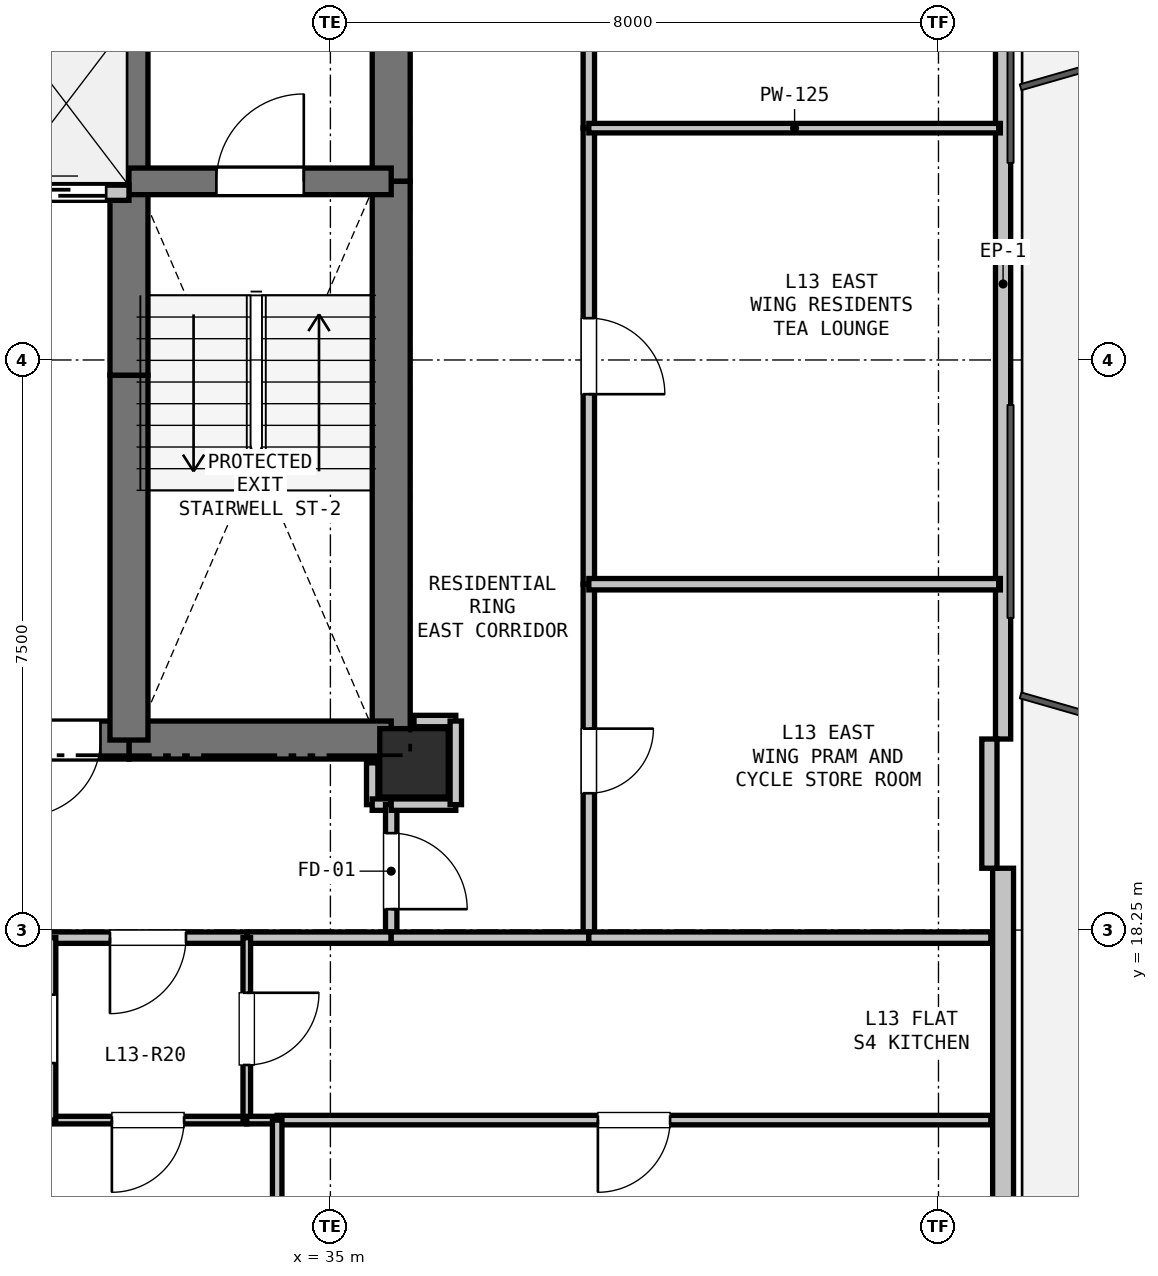
"""IFC4 building model, lengths in metres.
Left out: names, types, materials, properties, quantities, classifications, styles, units other than length and angle.
Written with IfcOpenShell. Run it as: python <this file> out.ifc"""

import sys

from ifc_helpers import new_model, si_unit, direction, frame, frame_2d, origin, origin_2d, place, context, subcontext, project, spatial, rectangle, extrude, element, fill, save


model = new_model("IFC4")
c1 = context("Model", 3, precision=1e-05, world=origin(), true_north=direction((0.0, 1.0)))
c2 = subcontext(c1, "Body", "Model", "MODEL_VIEW")
j1 = project(units=[si_unit("LENGTHUNIT", "METRE"), si_unit("PLANEANGLEUNIT", "RADIAN")], contexts=[c1])
p1 = place(None, origin())
s1 = spatial("IfcSite", under=j1, at=p1, CompositionType="ELEMENT")
p2 = place(p1, origin())
s2 = spatial("IfcBuilding", under=s1, at=p2, CompositionType="ELEMENT")
p3 = place(p2, frame((0.0, 0.0, 48.9)))
s3 = spatial("IfcBuildingStorey", under=s2, at=p3, CompositionType="ELEMENT", Elevation=48.9)
p4 = place(p3, frame((36.1, 20.45, 0.0), z_axis=(0.0, 0.0, 1.0), x_axis=(1.0, 0.0, 0.0)))
e1 = element("IfcColumn", 1, at=p4, inside=s3, PredefinedType="COLUMN", context=c2, shape_type="SweptSolid", body=[
    extrude(rectangle(XDim=0.9, YDim=0.9, at=origin_2d()), origin(), (0.0, 0.0, 1.0), 3.3),
])
p5 = place(p3, frame((43.85, 32.737, 0.0), z_axis=(0.0, 0.0, 1.0), x_axis=(0.0, -1.0, 0.0)))
e2 = element("IfcWall", 2, at=p5, inside=s3, PredefinedType="PARAPET", context=c2, shape_type="SweptSolid", body=[
    extrude(rectangle(XDim=11.973, YDim=0.2, at=frame_2d((5.987, 0.0))), origin(), (0.0, 0.0, 1.0), 0.2),
])
p6 = place(p3, frame((43.85, 19.063, 0.0), z_axis=(0.0, 0.0, 1.0), x_axis=(0.0, -1.0, 0.0)))
e3 = element("IfcWall", 3, at=p6, inside=s3, PredefinedType="SOLIDWALL", context=c2, shape_type="SweptSolid", body=[
    extrude(rectangle(XDim=12.673, YDim=0.275, at=frame_2d((6.336, 0.0))), origin(), (0.0, 0.0, 1.0), 2.66),
])
p7 = place(p3, frame((43.67, 20.763, 0.0), z_axis=(0.0, 0.0, 1.0), x_axis=(0.0, -1.0, 0.0)))
e4 = element("IfcWall", 4, at=p7, inside=s3, PredefinedType="PARAPET", context=c2, shape_type="SweptSolid", body=[
    extrude(rectangle(XDim=1.7, YDim=0.2, at=frame_2d((0.85, 0.0))), origin(), (0.0, 0.0, 1.0), 2.66),
])
p8 = place(p3, frame((35.8, 32.75, 0.0), z_axis=(0.0, 0.0, 1.0), x_axis=(0.0, -1.0, 0.0)))
e5 = element("IfcWall", 5, at=p8, inside=s3, PredefinedType="SHEAR", context=c2, shape_type="SweptSolid", body=[
    extrude(rectangle(XDim=4.65, YDim=0.5, at=frame_2d((2.325, 0.0))), origin(), (0.0, 0.0, 1.0), 3.04),
])
p9 = place(p3, frame((35.8, 28.1, 0.0), z_axis=(0.0, 0.0, 1.0), x_axis=(0.0, -1.0, 0.0)))
e6 = element("IfcWall", 6, at=p9, inside=s3, PredefinedType="SHEAR", context=c2, shape_type="SweptSolid", body=[
    extrude(rectangle(XDim=7.35, YDim=0.5, at=frame_2d((3.675, 0.0))), origin(), (0.0, 0.0, 1.0), 3.04),
])
p10 = place(p3, frame((35.8, 20.75, 0.0), z_axis=(0.0, 0.0, 1.0), x_axis=(-1.0, 0.0, 0.0)))
e7 = element("IfcWall", 7, at=p10, inside=s3, PredefinedType="SHEAR", context=c2, shape_type="SweptSolid", body=[
    extrude(rectangle(XDim=3.45, YDim=0.5, at=frame_2d((1.725, 0.0))), origin(), (0.0, 0.0, 1.0), 3.04),
])
p11 = place(p3, frame((32.35, 20.75, 0.0), z_axis=(0.0, 0.0, 1.0), x_axis=(-1.0, 0.0, 0.0)))
e8 = element("IfcWall", 8, at=p11, inside=s3, PredefinedType="SHEAR", context=c2, shape_type="SweptSolid", body=[
    extrude(rectangle(XDim=1.75, YDim=0.5, at=frame_2d((0.875, 0.0))), origin(), (0.0, 0.0, 1.0), 3.04),
])
p12 = place(p11, frame((0.375, 0.0, 0.0)))
e9 = element("IfcOpeningElement", 9, at=p12, cuts=e8, PredefinedType="OPENING", context=c2, shape_type="SweptSolid", body=[
    extrude(rectangle(XDim=1.0, YDim=2.15, at=frame_2d((0.5, 1.075))), frame((0.0, 0.26, 0.0), z_axis=(0.0, -1.0, 0.0), x_axis=(1.0, 0.0, 0.0)), (0.0, 0.0, 1.0), 0.52),
])
p13 = place(p3, frame((32.35, 20.75, 0.0), z_axis=(0.0, 0.0, 1.0), x_axis=(0.0, 1.0, 0.0)))
e10 = element("IfcWall", 10, at=p13, inside=s3, PredefinedType="SHEAR", context=c2, shape_type="SweptSolid", body=[
    extrude(rectangle(XDim=4.8, YDim=0.5, at=frame_2d((2.4, 0.0))), origin(), (0.0, 0.0, 1.0), 3.04),
])
p14 = place(p3, frame((32.35, 25.55, 0.0), z_axis=(0.0, 0.0, 1.0), x_axis=(0.0, 1.0, 0.0)))
e11 = element("IfcWall", 11, at=p14, inside=s3, PredefinedType="SHEAR", context=c2, shape_type="SweptSolid", body=[
    extrude(rectangle(XDim=2.4, YDim=0.5, at=frame_2d((1.2, 0.0))), origin(), (0.0, 0.0, 1.0), 3.04),
])
p15 = place(p3, frame((32.35, 27.95, 0.0), z_axis=(0.0, 0.0, 1.0), x_axis=(0.0, 1.0, 0.0)))
e12 = element("IfcWall", 12, at=p15, inside=s3, PredefinedType="SHEAR", context=c2, shape_type="SweptSolid", body=[
    extrude(rectangle(XDim=2.8, YDim=0.5, at=frame_2d((1.4, 0.0))), origin(), (0.0, 0.0, 1.0), 3.04),
])
p16 = place(p3, frame((32.35, 28.1, 0.0), z_axis=(0.0, 0.0, 1.0), x_axis=(1.0, 0.0, 0.0)))
e13 = element("IfcWall", 13, at=p16, inside=s3, PredefinedType="SHEAR", context=c2, shape_type="SweptSolid", body=[
    extrude(rectangle(XDim=3.45, YDim=0.35, at=frame_2d((1.725, 0.0))), origin(), (0.0, 0.0, 1.0), 3.04),
])
p17 = place(p16, frame((1.15, 0.0, 0.0)))
e14 = element("IfcOpeningElement", 14, at=p17, cuts=e13, PredefinedType="OPENING", context=c2, shape_type="SweptSolid", body=[
    extrude(rectangle(XDim=1.15, YDim=2.15, at=frame_2d((0.575, 1.075))), frame((0.0, 0.185, 0.0), z_axis=(0.0, -1.0, 0.0), x_axis=(1.0, 0.0, 0.0)), (0.0, 0.0, 1.0), 0.37),
])
p18 = place(p3, frame((27.4, 27.95, 0.0), z_axis=(0.0, 0.0, 1.0), x_axis=(1.0, 0.0, 0.0)))
e15 = element("IfcWall", 15, at=p18, inside=s3, PredefinedType="PARTITIONING", context=c2, shape_type="SweptSolid", body=[
    extrude(rectangle(XDim=4.95, YDim=0.2, at=frame_2d((2.475, 0.0))), origin(), (0.0, 0.0, 1.0), 3.04),
])
p19 = place(p18, frame((0.25, 0.0, 0.0)))
e16 = element("IfcOpeningElement", 16, at=p19, cuts=e15, PredefinedType="OPENING", context=c2, shape_type="SweptSolid", body=[
    extrude(rectangle(XDim=1.1, YDim=2.15, at=frame_2d((0.55, 1.075))), frame((0.0, 0.11, 0.0), z_axis=(0.0, -1.0, 0.0), x_axis=(1.0, 0.0, 0.0)), (0.0, 0.0, 1.0), 0.22),
])
p20 = place(p18, frame((1.9, 0.0, 0.0)))
e17 = element("IfcOpeningElement", 17, at=p20, cuts=e15, PredefinedType="OPENING", context=c2, shape_type="SweptSolid", body=[
    extrude(rectangle(XDim=1.1, YDim=2.15, at=frame_2d((0.55, 1.075))), frame((0.0, 0.11, 0.0), z_axis=(0.0, -1.0, 0.0), x_axis=(1.0, 0.0, 0.0)), (0.0, 0.0, 1.0), 0.22),
])
p21 = place(p18, frame((3.55, 0.0, 0.0)))
e18 = element("IfcOpeningElement", 18, at=p21, cuts=e15, PredefinedType="OPENING", context=c2, shape_type="SweptSolid", body=[
    extrude(rectangle(XDim=1.1, YDim=2.15, at=frame_2d((0.55, 1.075))), frame((0.0, 0.11, 0.0), z_axis=(0.0, -1.0, 0.0), x_axis=(1.0, 0.0, 0.0)), (0.0, 0.0, 1.0), 0.22),
])
p22 = place(p3, frame((35.55, 20.45, 0.0), z_axis=(0.0, 0.0, 1.0), x_axis=(0.0, -1.0, 0.0)))
e19 = element("IfcWall", 19, at=p22, inside=s3, PredefinedType="PARTITIONING", context=c2, shape_type="SweptSolid", body=[
    extrude(rectangle(XDim=0.55, YDim=0.15, at=frame_2d((0.275, 0.0))), origin(), (0.0, 0.0, 1.0), 2.488),
])
p23 = place(p3, frame((35.55, 19.9, 0.0), z_axis=(0.0, 0.0, 1.0), x_axis=(1.0, 0.0, 0.0)))
e20 = element("IfcWall", 20, at=p23, inside=s3, PredefinedType="PARTITIONING", context=c2, shape_type="SweptSolid", body=[
    extrude(rectangle(XDim=0.25, YDim=0.15, at=frame_2d((0.125, 0.0))), origin(), (0.0, 0.0, 1.0), 3.04),
])
p24 = place(p3, frame((35.8, 19.9, 0.0), z_axis=(0.0, 0.0, 1.0), x_axis=(0.0, -1.0, 0.0)))
e21 = element("IfcWall", 21, at=p24, inside=s3, PredefinedType="PARTITIONING", context=c2, shape_type="SweptSolid", body=[
    extrude(rectangle(XDim=1.75, YDim=0.15, at=frame_2d((0.875, 0.0))), origin(), (0.0, 0.0, 1.0), 3.04),
])
p25 = place(p24, frame((0.375, 0.0, 0.0)))
e22 = element("IfcOpeningElement", 22, at=p25, cuts=e21, PredefinedType="OPENING", context=c2, shape_type="SweptSolid", body=[
    extrude(rectangle(XDim=1.0, YDim=2.15, at=frame_2d((0.5, 1.075))), frame((0.0, 0.085, 0.0), z_axis=(0.0, -1.0, 0.0), x_axis=(1.0, 0.0, 0.0)), (0.0, 0.0, 1.0), 0.17),
])
p26 = place(p3, frame((35.8, 18.15, 0.0), z_axis=(0.0, 0.0, 1.0), x_axis=(-1.0, 0.0, 0.0)))
e23 = element("IfcWall", 23, at=p26, inside=s3, PredefinedType="PARTITIONING", context=c2, shape_type="SweptSolid", body=[
    extrude(rectangle(XDim=1.9, YDim=0.15, at=frame_2d((0.95, 0.0))), origin(), (0.0, 0.0, 1.0), 3.04),
])
p27 = place(p3, frame((33.9, 18.15, 0.0), z_axis=(0.0, 0.0, 1.0), x_axis=(-1.0, 0.0, 0.0)))
e24 = element("IfcWall", 24, at=p27, inside=s3, PredefinedType="PARTITIONING", context=c2, shape_type="SweptSolid", body=[
    extrude(rectangle(XDim=2.6, YDim=0.15, at=frame_2d((1.3, 0.0))), origin(), (0.0, 0.0, 1.0), 3.04),
])
p28 = place(p27, frame((0.8, 0.0, 0.0)))
e25 = element("IfcOpeningElement", 25, at=p28, cuts=e24, PredefinedType="OPENING", context=c2, shape_type="SweptSolid", body=[
    extrude(rectangle(XDim=1.0, YDim=2.15, at=frame_2d((0.5, 1.075))), frame((0.0, 0.085, 0.0), z_axis=(0.0, -1.0, 0.0), x_axis=(1.0, 0.0, 0.0)), (0.0, 0.0, 1.0), 0.17),
])
p29 = place(p3, frame((36.65, 21.0, 0.0), z_axis=(0.0, 0.0, 1.0), x_axis=(-1.0, 0.0, 0.0)))
e26 = element("IfcWall", 26, at=p29, inside=s3, PredefinedType="PARTITIONING", context=c2, shape_type="SweptSolid", body=[
    extrude(rectangle(XDim=0.55, YDim=0.15, at=frame_2d((0.275, 0.0))), origin(), (0.0, 0.0, 1.0), 2.488),
])
p30 = place(p3, frame((38.4, 32.08, 0.0), z_axis=(0.0, 0.0, 1.0), x_axis=(0.0, -1.0, 0.0)))
e27 = element("IfcWall", 27, at=p30, inside=s3, PredefinedType="PARTITIONING", context=c2, shape_type="SweptSolid", body=[
    extrude(rectangle(XDim=3.28, YDim=0.15, at=frame_2d((1.64, 0.0))), origin(), (0.0, 0.0, 1.0), 3.04),
])
p31 = place(p30, frame((1.14, 0.0, 0.0)))
e28 = element("IfcOpeningElement", 28, at=p31, cuts=e27, PredefinedType="OPENING", context=c2, shape_type="SweptSolid", body=[
    extrude(rectangle(XDim=1.0, YDim=2.15, at=frame_2d((0.5, 1.075))), frame((0.0, 0.085, 0.0), z_axis=(0.0, -1.0, 0.0), x_axis=(1.0, 0.0, 0.0)), (0.0, 0.0, 1.0), 0.17),
])
p32 = place(p3, frame((38.4, 28.8, 0.0), z_axis=(0.0, 0.0, 1.0), x_axis=(0.0, -1.0, 0.0)))
e29 = element("IfcWall", 29, at=p32, inside=s3, PredefinedType="PARTITIONING", context=c2, shape_type="SweptSolid", body=[
    extrude(rectangle(XDim=6.0, YDim=0.15, at=frame_2d((3.0, 0.0))), origin(), (0.0, 0.0, 1.0), 3.04),
])
p33 = place(p32, frame((2.5, 0.0, 0.0)))
e30 = element("IfcOpeningElement", 30, at=p33, cuts=e29, PredefinedType="OPENING", context=c2, shape_type="SweptSolid", body=[
    extrude(rectangle(XDim=1.0, YDim=2.15, at=frame_2d((0.5, 1.075))), frame((0.0, 0.085, 0.0), z_axis=(0.0, -1.0, 0.0), x_axis=(1.0, 0.0, 0.0)), (0.0, 0.0, 1.0), 0.17),
])
p34 = place(p3, frame((38.4, 22.8, 0.0), z_axis=(0.0, 0.0, 1.0), x_axis=(0.0, -1.0, 0.0)))
e31 = element("IfcWall", 31, at=p34, inside=s3, PredefinedType="PARTITIONING", context=c2, shape_type="SweptSolid", body=[
    extrude(rectangle(XDim=4.65, YDim=0.15, at=frame_2d((2.325, 0.0))), origin(), (0.0, 0.0, 1.0), 3.04),
])
p35 = place(p34, frame((1.9, 0.0, 0.0)))
e32 = element("IfcOpeningElement", 32, at=p35, cuts=e31, PredefinedType="OPENING", context=c2, shape_type="SweptSolid", body=[
    extrude(rectangle(XDim=0.85, YDim=2.1, at=frame_2d((0.425, 1.05))), frame((0.0, 0.085, 0.0), z_axis=(0.0, -1.0, 0.0), x_axis=(1.0, 0.0, 0.0)), (0.0, 0.0, 1.0), 0.17),
])
p36 = place(p3, frame((38.4, 18.15, 0.0), z_axis=(0.0, 0.0, 1.0), x_axis=(-1.0, 0.0, 0.0)))
e33 = element("IfcWall", 33, at=p36, inside=s3, PredefinedType="PARTITIONING", context=c2, shape_type="SweptSolid", body=[
    extrude(rectangle(XDim=2.6, YDim=0.15, at=frame_2d((1.3, 0.0))), origin(), (0.0, 0.0, 1.0), 2.338),
])
p37 = place(p3, frame((35.8, 19.9, 0.0), z_axis=(0.0, 0.0, 1.0), x_axis=(1.0, 0.0, 0.0)))
e34 = element("IfcWall", 34, at=p37, inside=s3, PredefinedType="PARTITIONING", context=c2, shape_type="SweptSolid", body=[
    extrude(rectangle(XDim=0.85, YDim=0.15, at=frame_2d((0.425, 0.0))), origin(), (0.0, 0.0, 1.0), 2.338),
])
p38 = place(p3, frame((36.65, 19.9, 0.0), z_axis=(0.0, 0.0, 1.0), x_axis=(0.0, 1.0, 0.0)))
e35 = element("IfcWall", 35, at=p38, inside=s3, PredefinedType="PARTITIONING", context=c2, shape_type="SweptSolid", body=[
    extrude(rectangle(XDim=1.1, YDim=0.15, at=frame_2d((0.55, 0.0))), origin(), (0.0, 0.0, 1.0), 3.04),
])
p39 = place(p3, frame((33.9, 15.75, 0.0), z_axis=(0.0, 0.0, 1.0), x_axis=(-1.0, 0.0, 0.0)))
e36 = element("IfcWall", 36, at=p39, inside=s3, PredefinedType="PARTITIONING", context=c2, shape_type="SweptSolid", body=[
    extrude(rectangle(XDim=2.6, YDim=0.1, at=frame_2d((1.3, 0.0))), origin(), (0.0, 0.0, 1.0), 3.04),
])
p40 = place(p39, frame((0.825, 0.0, 0.0)))
e37 = element("IfcOpeningElement", 37, at=p40, cuts=e36, PredefinedType="OPENING", context=c2, shape_type="SweptSolid", body=[
    extrude(rectangle(XDim=0.95, YDim=2.1, at=frame_2d((0.475, 1.05))), frame((0.0, 0.06, 0.0), z_axis=(0.0, -1.0, 0.0), x_axis=(1.0, 0.0, 0.0)), (0.0, 0.0, 1.0), 0.12),
])
p41 = place(p3, frame((31.3, 15.75, 0.0), z_axis=(0.0, 0.0, 1.0), x_axis=(0.0, 1.0, 0.0)))
e38 = element("IfcWall", 38, at=p41, inside=s3, PredefinedType="PLUMBINGWALL", context=c2, shape_type="SweptSolid", body=[
    extrude(rectangle(XDim=2.4, YDim=0.175, at=frame_2d((1.2, 0.0))), origin(), (0.0, 0.0, 1.0), 3.04),
])
p42 = place(p41, frame((0.75, 0.0, 0.0)))
e39 = element("IfcOpeningElement", 39, at=p42, cuts=e38, PredefinedType="OPENING", context=c2, shape_type="SweptSolid", body=[
    extrude(rectangle(XDim=0.9, YDim=2.1, at=frame_2d((0.45, 1.05))), frame((0.0, 0.097, 0.0), z_axis=(0.0, -1.0, 0.0), x_axis=(1.0, 0.0, 0.0)), (0.0, 0.0, 1.0), 0.195),
])
p43 = place(p3, frame((33.9, 18.15, 0.0), z_axis=(0.0, 0.0, 1.0), x_axis=(0.0, -1.0, 0.0)))
e40 = element("IfcWall", 40, at=p43, inside=s3, PredefinedType="PARTITIONING", context=c2, shape_type="SweptSolid", body=[
    extrude(rectangle(XDim=2.4, YDim=0.1, at=frame_2d((1.2, 0.0))), origin(), (0.0, 0.0, 1.0), 3.04),
])
p44 = place(p43, frame((0.725, 0.0, 0.0)))
e41 = element("IfcOpeningElement", 41, at=p44, cuts=e40, PredefinedType="OPENING", context=c2, shape_type="SweptSolid", body=[
    extrude(rectangle(XDim=0.95, YDim=2.1, at=frame_2d((0.475, 1.05))), frame((0.0, 0.06, 0.0), z_axis=(0.0, -1.0, 0.0), x_axis=(1.0, 0.0, 0.0)), (0.0, 0.0, 1.0), 0.12),
])
p45 = place(p3, frame((38.4, 18.15, 0.0), z_axis=(0.0, 0.0, 1.0), x_axis=(1.0, 0.0, 0.0)))
e42 = element("IfcWall", 42, at=p45, inside=s3, PredefinedType="PARTITIONING", context=c2, shape_type="SweptSolid", body=[
    extrude(rectangle(XDim=5.289, YDim=0.15, at=frame_2d((2.644, 0.0))), origin(), (0.0, 0.0, 1.0), 2.365),
])
p46 = place(p3, frame((43.688, 15.75, 0.0), z_axis=(0.0, 0.0, 1.0), x_axis=(-1.0, 0.0, 0.0)))
e43 = element("IfcWall", 43, at=p46, inside=s3, PredefinedType="PARTITIONING", context=c2, shape_type="SweptSolid", body=[
    extrude(rectangle(XDim=9.388, YDim=0.125, at=frame_2d((4.694, 0.0))), origin(), (0.0, 0.0, 1.0), 2.338),
])
p47 = place(p46, frame((4.219, 0.0, 0.0)))
e44 = element("IfcOpeningElement", 44, at=p47, cuts=e43, PredefinedType="OPENING", context=c2, shape_type="SweptSolid", body=[
    extrude(rectangle(XDim=0.95, YDim=2.1, at=frame_2d((0.475, 1.05))), frame((0.0, 0.073, 0.0), z_axis=(0.0, -1.0, 0.0), x_axis=(1.0, 0.0, 0.0)), (0.0, 0.0, 1.0), 0.145),
])
p48 = place(p3, frame((34.3, 15.75, 0.0), z_axis=(0.0, 0.0, 1.0), x_axis=(-1.0, 0.0, 0.0)))
e45 = element("IfcWall", 45, at=p48, inside=s3, PredefinedType="PARTITIONING", context=c2, shape_type="SweptSolid", body=[
    extrude(rectangle(XDim=0.4, YDim=0.1, at=frame_2d((0.2, 0.0))), origin(), (0.0, 0.0, 1.0), 3.04),
])
p49 = place(p3, frame((43.814, 28.8, 0.0), z_axis=(0.0, 0.0, 1.0), x_axis=(-1.0, 0.0, 0.0)))
e46 = element("IfcWall", 46, at=p49, inside=s3, PredefinedType="PARTITIONING", context=c2, shape_type="SweptSolid", body=[
    extrude(rectangle(XDim=5.414, YDim=0.125, at=frame_2d((2.707, 0.0))), origin(), (0.0, 0.0, 1.0), 2.365),
])
p50 = place(p3, frame((43.814, 22.8, 0.0), z_axis=(0.0, 0.0, 1.0), x_axis=(-1.0, 0.0, 0.0)))
e47 = element("IfcWall", 47, at=p50, inside=s3, PredefinedType="PARTITIONING", context=c2, shape_type="SweptSolid", body=[
    extrude(rectangle(XDim=5.414, YDim=0.15, at=frame_2d((2.707, 0.0))), origin(), (0.0, 0.0, 1.0), 2.365),
])
p51 = place(p3, frame((34.3, 15.75, 0.0), z_axis=(0.0, 0.0, 1.0), x_axis=(0.0, -1.0, 0.0)))
e48 = element("IfcWall", 48, at=p51, inside=s3, PredefinedType="PARTITIONING", context=c2, shape_type="SweptSolid", body=[
    extrude(rectangle(XDim=6.06, YDim=0.125, at=frame_2d((3.03, 0.0))), origin(), (0.0, 0.0, 1.0), 3.04),
])
p52 = place(p51, frame((2.555, 0.0, 0.0)))
e49 = element("IfcOpeningElement", 49, at=p52, cuts=e48, PredefinedType="OPENING", context=c2, shape_type="SweptSolid", body=[
    extrude(rectangle(XDim=0.95, YDim=2.1, at=frame_2d((0.475, 1.05))), frame((0.0, 0.073, 0.0), z_axis=(0.0, -1.0, 0.0), x_axis=(1.0, 0.0, 0.0)), (0.0, 0.0, 1.0), 0.145),
])
p53 = place(p21, origin())
e50 = element("IfcDoor", 50, at=p53, inside=s3, OperationType="SLIDING_TO_LEFT", PredefinedType="DOOR", context=c2, shape_type="SweptSolid", body=[
    extrude(rectangle(XDim=1.1, YDim=2.15, at=frame_2d((0.55, 1.075))), frame((0.0, 0.025, 0.0), z_axis=(0.0, -1.0, 0.0), x_axis=(1.0, 0.0, 0.0)), (0.0, 0.0, 1.0), 0.05),
])
fill(e18, e50)
p54 = place(p12, origin())
e51 = element("IfcDoor", 51, at=p54, inside=s3, OperationType="SINGLE_SWING_RIGHT", PredefinedType="DOOR", context=c2, shape_type="SweptSolid", body=[
    extrude(rectangle(XDim=1.0, YDim=2.15, at=frame_2d((0.5, 1.075))), frame((0.0, 0.025, 0.0), z_axis=(0.0, -1.0, 0.0), x_axis=(1.0, 0.0, 0.0)), (0.0, 0.0, 1.0), 0.05),
])
fill(e9, e51)
p55 = place(p17, origin())
e52 = element("IfcDoor", 52, at=p55, inside=s3, OperationType="SINGLE_SWING_RIGHT", PredefinedType="DOOR", context=c2, shape_type="SweptSolid", body=[
    extrude(rectangle(XDim=1.15, YDim=2.15, at=frame_2d((0.575, 1.075))), frame((0.0, 0.025, 0.0), z_axis=(0.0, -1.0, 0.0), x_axis=(1.0, 0.0, 0.0)), (0.0, 0.0, 1.0), 0.05),
])
fill(e14, e52)
p56 = place(p25, origin())
e53 = element("IfcDoor", 53, at=p56, inside=s3, OperationType="SINGLE_SWING_RIGHT", PredefinedType="DOOR", context=c2, shape_type="SweptSolid", body=[
    extrude(rectangle(XDim=1.0, YDim=2.15, at=frame_2d((0.5, 1.075))), frame((0.0, 0.025, 0.0), z_axis=(0.0, -1.0, 0.0), x_axis=(1.0, 0.0, 0.0)), (0.0, 0.0, 1.0), 0.05),
])
fill(e22, e53)
p57 = place(p28, origin())
e54 = element("IfcDoor", 54, at=p57, inside=s3, OperationType="SINGLE_SWING_RIGHT", PredefinedType="DOOR", context=c2, shape_type="SweptSolid", body=[
    extrude(rectangle(XDim=1.0, YDim=2.15, at=frame_2d((0.5, 1.075))), frame((0.0, 0.025, 0.0), z_axis=(0.0, -1.0, 0.0), x_axis=(1.0, 0.0, 0.0)), (0.0, 0.0, 1.0), 0.05),
])
fill(e25, e54)
p58 = place(p33, origin())
e55 = element("IfcDoor", 55, at=p58, inside=s3, OperationType="SINGLE_SWING_RIGHT", PredefinedType="DOOR", context=c2, shape_type="SweptSolid", body=[
    extrude(rectangle(XDim=1.0, YDim=2.15, at=frame_2d((0.5, 1.075))), frame((0.0, 0.025, 0.0), z_axis=(0.0, -1.0, 0.0), x_axis=(1.0, 0.0, 0.0)), (0.0, 0.0, 1.0), 0.05),
])
fill(e30, e55)
p59 = place(p35, origin())
e56 = element("IfcDoor", 56, at=p59, inside=s3, OperationType="SINGLE_SWING_LEFT", PredefinedType="DOOR", context=c2, shape_type="SweptSolid", body=[
    extrude(rectangle(XDim=0.85, YDim=2.1, at=frame_2d((0.425, 1.05))), frame((0.0, 0.025, 0.0), z_axis=(0.0, -1.0, 0.0), x_axis=(1.0, 0.0, 0.0)), (0.0, 0.0, 1.0), 0.05),
])
fill(e32, e56)
p60 = place(p44, origin())
e57 = element("IfcDoor", 57, at=p60, inside=s3, OperationType="SINGLE_SWING_LEFT", PredefinedType="DOOR", context=c2, shape_type="SweptSolid", body=[
    extrude(rectangle(XDim=0.95, YDim=2.1, at=frame_2d((0.475, 1.05))), frame((0.0, 0.025, 0.0), z_axis=(0.0, -1.0, 0.0), x_axis=(1.0, 0.0, 0.0)), (0.0, 0.0, 1.0), 0.05),
])
fill(e41, e57)
p61 = place(p40, origin())
e58 = element("IfcDoor", 58, at=p61, inside=s3, OperationType="SINGLE_SWING_RIGHT", PredefinedType="DOOR", context=c2, shape_type="SweptSolid", body=[
    extrude(rectangle(XDim=0.95, YDim=2.1, at=frame_2d((0.475, 1.05))), frame((0.0, 0.025, 0.0), z_axis=(0.0, -1.0, 0.0), x_axis=(1.0, 0.0, 0.0)), (0.0, 0.0, 1.0), 0.05),
])
fill(e37, e58)
p62 = place(p47, origin())
e59 = element("IfcDoor", 59, at=p62, inside=s3, OperationType="SINGLE_SWING_RIGHT", PredefinedType="DOOR", context=c2, shape_type="SweptSolid", body=[
    extrude(rectangle(XDim=0.95, YDim=2.1, at=frame_2d((0.475, 1.05))), frame((0.0, 0.025, 0.0), z_axis=(0.0, -1.0, 0.0), x_axis=(1.0, 0.0, 0.0)), (0.0, 0.0, 1.0), 0.05),
])
fill(e44, e59)
save(model, sys.argv[1])
